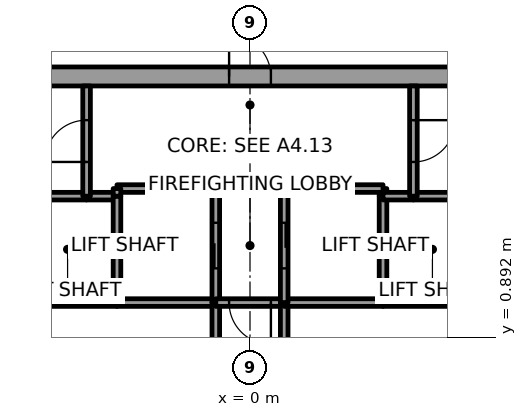
"""IFC4 building model, lengths in metres.
Left out: names, types, materials, properties, quantities, classifications, styles, units other than length and angle.
Written with IfcOpenShell. Run it as: python <this file> out.ifc"""

import sys

from ifc_helpers import new_model, si_unit, direction, frame, frame_2d, origin, place, context, subcontext, project, spatial, rectangle, extrude, element, fill, save


model = new_model("IFC4")
c1 = context("Model", 3, precision=1e-05, world=origin(), true_north=direction((0.0, 1.0)))
c2 = subcontext(c1, "Body", "Model", "MODEL_VIEW")
j1 = project(units=[si_unit("LENGTHUNIT", "METRE"), si_unit("PLANEANGLEUNIT", "RADIAN")], contexts=[c1])
p1 = place(None, origin())
s1 = spatial("IfcSite", under=j1, at=p1, CompositionType="ELEMENT")
p2 = place(p1, origin())
s2 = spatial("IfcBuilding", under=s1, at=p2, CompositionType="ELEMENT")
p3 = place(p2, frame((0.0, 0.0, 62.8)))
s3 = spatial("IfcBuildingStorey", under=s2, at=p3, CompositionType="ELEMENT", Elevation=62.8)
p4 = place(p3, frame((-11.0, 7.75, 0.0), z_axis=(0.0, 0.0, 1.0), x_axis=(1.0, 0.0, 0.0)))
e1 = element("IfcWall", 1, at=p4, inside=s3, PredefinedType="SHEAR", context=c2, shape_type="SweptSolid", body=[
    extrude(rectangle(XDim=22.0, YDim=0.5, at=frame_2d((11.0, 0.0))), origin(), (0.0, 0.0, 1.0), 3.7),
])
p5 = place(p4, frame((10.45, 0.0, 0.0)))
e2 = element("IfcOpeningElement", 2, at=p5, cuts=e1, PredefinedType="OPENING", context=c2, shape_type="SweptSolid", body=[
    extrude(rectangle(XDim=1.1, YDim=2.1, at=frame_2d((0.55, 1.05))), frame((0.0, 0.25, 0.0), z_axis=(0.0, -1.0, 0.0), x_axis=(1.0, 0.0, 0.0)), (0.0, 0.0, 1.0), 0.5),
])
p6 = place(p3, frame((-3.5, 1.8, 0.0), z_axis=(0.0, 0.0, 1.0), x_axis=(-1.0, 0.0, 0.0)))
e3 = element("IfcWall", 3, at=p6, inside=s3, PredefinedType="SOLIDWALL", context=c2, shape_type="SweptSolid", body=[
    extrude(rectangle(XDim=2.6, YDim=0.2, at=frame_2d((1.3, 0.0))), origin(), (0.0, 0.0, 1.0), 3.55),
])
p7 = place(p3, frame((-4.3, 4.6, 0.0), z_axis=(0.0, 0.0, 1.0), x_axis=(-1.0, 0.0, 0.0)))
e4 = element("IfcWall", 4, at=p7, inside=s3, PredefinedType="SOLIDWALL", context=c2, shape_type="SweptSolid", body=[
    extrude(rectangle(XDim=1.8, YDim=0.2, at=frame_2d((0.9, 0.0))), origin(), (0.0, 0.0, 1.0), 3.55),
])
p8 = place(p3, frame((-3.5, 4.6, 0.0), z_axis=(0.0, 0.0, 1.0), x_axis=(-1.0, 0.0, 0.0)))
e5 = element("IfcWall", 5, at=p8, inside=s3, PredefinedType="SOLIDWALL", context=c2, shape_type="SweptSolid", body=[
    extrude(rectangle(XDim=0.8, YDim=0.2, at=frame_2d((0.4, 0.0))), origin(), (0.0, 0.0, 1.0), 3.55),
])
p9 = place(p3, frame((-4.3, 4.6, 0.0), z_axis=(0.0, 0.0, 1.0), x_axis=(0.0, 1.0, 0.0)))
e6 = element("IfcWall", 6, at=p9, inside=s3, PredefinedType="SOLIDWALL", context=c2, shape_type="SweptSolid", body=[
    extrude(rectangle(XDim=2.9, YDim=0.2, at=frame_2d((1.45, 0.0))), origin(), (0.0, 0.0, 1.0), 3.55),
])
p10 = place(p9, frame((0.9, 0.0, 0.0)))
e7 = element("IfcOpeningElement", 7, at=p10, cuts=e6, PredefinedType="OPENING", context=c2, shape_type="SweptSolid", body=[
    extrude(rectangle(XDim=1.1, YDim=2.1, at=frame_2d((0.55, 1.05))), frame((0.0, 0.1, 0.0), z_axis=(0.0, -1.0, 0.0), x_axis=(1.0, 0.0, 0.0)), (0.0, 0.0, 1.0), 0.2),
])
p11 = place(p3, frame((-0.9, 1.8, 0.0), z_axis=(0.0, 0.0, 1.0), x_axis=(-1.0, 0.0, 0.0)))
e8 = element("IfcWall", 8, at=p11, inside=s3, PredefinedType="SOLIDWALL", context=c2, shape_type="SweptSolid", body=[
    extrude(rectangle(XDim=2.6, YDim=0.2, at=frame_2d((1.3, 0.0))), origin(), (0.0, 0.0, 1.0), 3.55),
])
p12 = place(p3, frame((-3.5, 4.6, 0.0), z_axis=(0.0, 0.0, 1.0), x_axis=(0.0, -1.0, 0.0)))
e9 = element("IfcWall", 9, at=p12, inside=s3, PredefinedType="SOLIDWALL", context=c2, shape_type="SweptSolid", body=[
    extrude(rectangle(XDim=2.8, YDim=0.2, at=frame_2d((1.4, 0.0))), origin(), (0.0, 0.0, 1.0), 3.55),
])
p13 = place(p3, frame((-0.9, 1.8, 0.0), z_axis=(0.0, 0.0, 1.0), x_axis=(0.0, 1.0, 0.0)))
e10 = element("IfcWall", 10, at=p13, inside=s3, PredefinedType="SOLIDWALL", context=c2, shape_type="SweptSolid", body=[
    extrude(rectangle(XDim=3.0, YDim=0.2, at=frame_2d((1.5, 0.0))), origin(), (0.0, 0.0, 1.0), 3.55),
])
p14 = place(p13, frame((0.9, 0.0, 0.0)))
e11 = element("IfcOpeningElement", 11, at=p14, cuts=e10, PredefinedType="OPENING", context=c2, shape_type="SweptSolid", body=[
    extrude(rectangle(XDim=1.2, YDim=2.1, at=frame_2d((0.6, 1.05))), frame((0.0, 0.1, 0.0), z_axis=(0.0, -1.0, 0.0), x_axis=(1.0, 0.0, 0.0)), (0.0, 0.0, 1.0), 0.2),
])
p15 = place(p3, frame((-0.9, 4.8, 0.0), z_axis=(0.0, 0.0, 1.0), x_axis=(-1.0, 0.0, 0.0)))
e12 = element("IfcWall", 12, at=p15, inside=s3, PredefinedType="SOLIDWALL", context=c2, shape_type="SweptSolid", body=[
    extrude(rectangle(XDim=2.6, YDim=0.2, at=frame_2d((1.3, 0.0))), origin(), (0.0, 0.0, 1.0), 3.55),
])
p16 = place(p3, frame((-3.5, 4.8, 0.0), z_axis=(0.0, 0.0, 1.0), x_axis=(0.0, -1.0, 0.0)))
e13 = element("IfcWall", 13, at=p16, inside=s3, PredefinedType="SOLIDWALL", context=c2, shape_type="SweptSolid", body=[
    extrude(rectangle(XDim=0.2, YDim=0.2, at=frame_2d((0.1, 0.0))), origin(), (0.0, 0.0, 1.0), 3.55),
])
p17 = place(p3, frame((-0.9, 1.8, 0.0), z_axis=(0.0, 0.0, 1.0), x_axis=(0.0, -1.0, 0.0)))
e14 = element("IfcWall", 14, at=p17, inside=s3, PredefinedType="SOLIDWALL", context=c2, shape_type="SweptSolid", body=[
    extrude(rectangle(XDim=3.6, YDim=0.2, at=frame_2d((1.8, 0.0))), origin(), (0.0, 0.0, 1.0), 3.55),
])
p18 = place(p17, frame((1.05, 0.0, 0.0)))
e15 = element("IfcOpeningElement", 15, at=p18, cuts=e14, PredefinedType="OPENING", context=c2, shape_type="SweptSolid", body=[
    extrude(rectangle(XDim=1.5, YDim=2.1, at=frame_2d((0.75, 1.05))), frame((0.0, 0.1, 0.0), z_axis=(0.0, -1.0, 0.0), x_axis=(1.0, 0.0, 0.0)), (0.0, 0.0, 1.0), 0.2),
])
p19 = place(p3, frame((0.9, 1.8, 0.0), z_axis=(0.0, 0.0, 1.0), x_axis=(-1.0, 0.0, 0.0)))
e16 = element("IfcWall", 16, at=p19, inside=s3, PredefinedType="SOLIDWALL", context=c2, shape_type="SweptSolid", body=[
    extrude(rectangle(XDim=1.8, YDim=0.2, at=frame_2d((0.9, 0.0))), origin(), (0.0, 0.0, 1.0), 3.55),
])
p20 = place(p19, frame((0.35, 0.0, 0.0)))
e17 = element("IfcOpeningElement", 17, at=p20, cuts=e16, PredefinedType="OPENING", context=c2, shape_type="SweptSolid", body=[
    extrude(rectangle(XDim=1.1, YDim=2.1, at=frame_2d((0.55, 1.05))), frame((0.0, 0.1, 0.0), z_axis=(0.0, -1.0, 0.0), x_axis=(1.0, 0.0, 0.0)), (0.0, 0.0, 1.0), 0.2),
])
p21 = place(p3, frame((0.9, -1.8, 0.0), z_axis=(0.0, 0.0, 1.0), x_axis=(0.0, 1.0, 0.0)))
e18 = element("IfcWall", 18, at=p21, inside=s3, PredefinedType="SOLIDWALL", context=c2, shape_type="SweptSolid", body=[
    extrude(rectangle(XDim=3.6, YDim=0.2, at=frame_2d((1.8, 0.0))), origin(), (0.0, 0.0, 1.0), 3.55),
])
p22 = place(p21, frame((1.05, 0.0, 0.0)))
e19 = element("IfcOpeningElement", 19, at=p22, cuts=e18, PredefinedType="OPENING", context=c2, shape_type="SweptSolid", body=[
    extrude(rectangle(XDim=1.5, YDim=2.1, at=frame_2d((0.75, 1.05))), frame((0.0, 0.1, 0.0), z_axis=(0.0, -1.0, 0.0), x_axis=(1.0, 0.0, 0.0)), (0.0, 0.0, 1.0), 0.2),
])
p23 = place(p3, frame((3.5, 1.8, 0.0), z_axis=(0.0, 0.0, 1.0), x_axis=(-1.0, 0.0, 0.0)))
e20 = element("IfcWall", 20, at=p23, inside=s3, PredefinedType="SOLIDWALL", context=c2, shape_type="SweptSolid", body=[
    extrude(rectangle(XDim=2.6, YDim=0.2, at=frame_2d((1.3, 0.0))), origin(), (0.0, 0.0, 1.0), 3.55),
])
p24 = place(p3, frame((3.5, 4.6, 0.0), z_axis=(0.0, 0.0, 1.0), x_axis=(0.0, 1.0, 0.0)))
e21 = element("IfcWall", 21, at=p24, inside=s3, PredefinedType="SOLIDWALL", context=c2, shape_type="SweptSolid", body=[
    extrude(rectangle(XDim=0.2, YDim=0.2, at=frame_2d((0.1, 0.0))), origin(), (0.0, 0.0, 1.0), 3.55),
])
p25 = place(p3, frame((3.5, 4.8, 0.0), z_axis=(0.0, 0.0, 1.0), x_axis=(-1.0, 0.0, 0.0)))
e22 = element("IfcWall", 22, at=p25, inside=s3, PredefinedType="SOLIDWALL", context=c2, shape_type="SweptSolid", body=[
    extrude(rectangle(XDim=2.6, YDim=0.2, at=frame_2d((1.3, 0.0))), origin(), (0.0, 0.0, 1.0), 3.55),
])
p26 = place(p3, frame((0.9, 4.8, 0.0), z_axis=(0.0, 0.0, 1.0), x_axis=(0.0, -1.0, 0.0)))
e23 = element("IfcWall", 23, at=p26, inside=s3, PredefinedType="SOLIDWALL", context=c2, shape_type="SweptSolid", body=[
    extrude(rectangle(XDim=3.0, YDim=0.2, at=frame_2d((1.5, 0.0))), origin(), (0.0, 0.0, 1.0), 3.55),
])
p27 = place(p26, frame((0.9, 0.0, 0.0)))
e24 = element("IfcOpeningElement", 24, at=p27, cuts=e23, PredefinedType="OPENING", context=c2, shape_type="SweptSolid", body=[
    extrude(rectangle(XDim=1.2, YDim=2.1, at=frame_2d((0.6, 1.05))), frame((0.0, 0.1, 0.0), z_axis=(0.0, -1.0, 0.0), x_axis=(1.0, 0.0, 0.0)), (0.0, 0.0, 1.0), 0.2),
])
p28 = place(p3, frame((6.1, 1.8, 0.0), z_axis=(0.0, 0.0, 1.0), x_axis=(-1.0, 0.0, 0.0)))
e25 = element("IfcWall", 25, at=p28, inside=s3, PredefinedType="SOLIDWALL", context=c2, shape_type="SweptSolid", body=[
    extrude(rectangle(XDim=2.6, YDim=0.2, at=frame_2d((1.3, 0.0))), origin(), (0.0, 0.0, 1.0), 3.55),
])
p29 = place(p3, frame((3.5, 1.8, 0.0), z_axis=(0.0, 0.0, 1.0), x_axis=(0.0, 1.0, 0.0)))
e26 = element("IfcWall", 26, at=p29, inside=s3, PredefinedType="SOLIDWALL", context=c2, shape_type="SweptSolid", body=[
    extrude(rectangle(XDim=2.8, YDim=0.2, at=frame_2d((1.4, 0.0))), origin(), (0.0, 0.0, 1.0), 3.55),
])
p30 = place(p3, frame((4.3, 4.6, 0.0), z_axis=(0.0, 0.0, 1.0), x_axis=(-1.0, 0.0, 0.0)))
e27 = element("IfcWall", 27, at=p30, inside=s3, PredefinedType="SOLIDWALL", context=c2, shape_type="SweptSolid", body=[
    extrude(rectangle(XDim=0.8, YDim=0.2, at=frame_2d((0.4, 0.0))), origin(), (0.0, 0.0, 1.0), 3.55),
])
p31 = place(p3, frame((6.1, 4.6, 0.0), z_axis=(0.0, 0.0, 1.0), x_axis=(-1.0, 0.0, 0.0)))
e28 = element("IfcWall", 28, at=p31, inside=s3, PredefinedType="SOLIDWALL", context=c2, shape_type="SweptSolid", body=[
    extrude(rectangle(XDim=1.8, YDim=0.2, at=frame_2d((0.9, 0.0))), origin(), (0.0, 0.0, 1.0), 3.55),
])
p32 = place(p3, frame((4.3, 7.5, 0.0), z_axis=(0.0, 0.0, 1.0), x_axis=(0.0, -1.0, 0.0)))
e29 = element("IfcWall", 29, at=p32, inside=s3, PredefinedType="SOLIDWALL", context=c2, shape_type="SweptSolid", body=[
    extrude(rectangle(XDim=2.9, YDim=0.2, at=frame_2d((1.45, 0.0))), origin(), (0.0, 0.0, 1.0), 3.55),
])
p33 = place(p32, frame((0.9, 0.0, 0.0)))
e30 = element("IfcOpeningElement", 30, at=p33, cuts=e29, PredefinedType="OPENING", context=c2, shape_type="SweptSolid", body=[
    extrude(rectangle(XDim=1.1, YDim=2.1, at=frame_2d((0.55, 1.05))), frame((0.0, 0.1, 0.0), z_axis=(0.0, -1.0, 0.0), x_axis=(1.0, 0.0, 0.0)), (0.0, 0.0, 1.0), 0.2),
])
p34 = place(p14, origin())
e31 = element("IfcDoor", 31, at=p34, inside=s3, OperationType="SLIDING_TO_RIGHT", PredefinedType="DOOR", context=c2, shape_type="SweptSolid", body=[
    extrude(rectangle(XDim=1.2, YDim=2.1, at=frame_2d((0.6, 1.05))), frame((0.0, 0.025, 0.0), z_axis=(0.0, -1.0, 0.0), x_axis=(1.0, 0.0, 0.0)), (0.0, 0.0, 1.0), 0.05),
])
fill(e11, e31)
p35 = place(p27, origin())
e32 = element("IfcDoor", 32, at=p35, inside=s3, OperationType="SLIDING_TO_RIGHT", PredefinedType="DOOR", context=c2, shape_type="SweptSolid", body=[
    extrude(rectangle(XDim=1.2, YDim=2.1, at=frame_2d((0.6, 1.05))), frame((0.0, 0.025, 0.0), z_axis=(0.0, -1.0, 0.0), x_axis=(1.0, 0.0, 0.0)), (0.0, 0.0, 1.0), 0.05),
])
fill(e24, e32)
p36 = place(p20, origin())
e33 = element("IfcDoor", 33, at=p36, inside=s3, OperationType="SINGLE_SWING_RIGHT", PredefinedType="DOOR", context=c2, shape_type="SweptSolid", body=[
    extrude(rectangle(XDim=1.1, YDim=2.1, at=frame_2d((0.55, 1.05))), frame((0.0, 0.025, 0.0), z_axis=(0.0, -1.0, 0.0), x_axis=(1.0, 0.0, 0.0)), (0.0, 0.0, 1.0), 0.05),
])
fill(e17, e33)
p37 = place(p10, origin())
e34 = element("IfcDoor", 34, at=p37, inside=s3, OperationType="SINGLE_SWING_RIGHT", PredefinedType="DOOR", context=c2, shape_type="SweptSolid", body=[
    extrude(rectangle(XDim=1.1, YDim=2.1, at=frame_2d((0.55, 1.05))), frame((0.0, 0.025, 0.0), z_axis=(0.0, -1.0, 0.0), x_axis=(1.0, 0.0, 0.0)), (0.0, 0.0, 1.0), 0.05),
])
fill(e7, e34)
p38 = place(p33, origin())
e35 = element("IfcDoor", 35, at=p38, inside=s3, OperationType="SINGLE_SWING_LEFT", PredefinedType="DOOR", context=c2, shape_type="SweptSolid", body=[
    extrude(rectangle(XDim=1.1, YDim=2.1, at=frame_2d((0.55, 1.05))), frame((0.0, 0.025, 0.0), z_axis=(0.0, -1.0, 0.0), x_axis=(1.0, 0.0, 0.0)), (0.0, 0.0, 1.0), 0.05),
])
fill(e30, e35)
p39 = place(p5, origin())
e36 = element("IfcDoor", 36, at=p39, inside=s3, OperationType="SINGLE_SWING_RIGHT", PredefinedType="DOOR", context=c2, shape_type="SweptSolid", body=[
    extrude(rectangle(XDim=1.1, YDim=2.1, at=frame_2d((0.55, 1.05))), frame((0.0, 0.025, 0.0), z_axis=(0.0, -1.0, 0.0), x_axis=(1.0, 0.0, 0.0)), (0.0, 0.0, 1.0), 0.05),
])
fill(e2, e36)
save(model, sys.argv[1])
